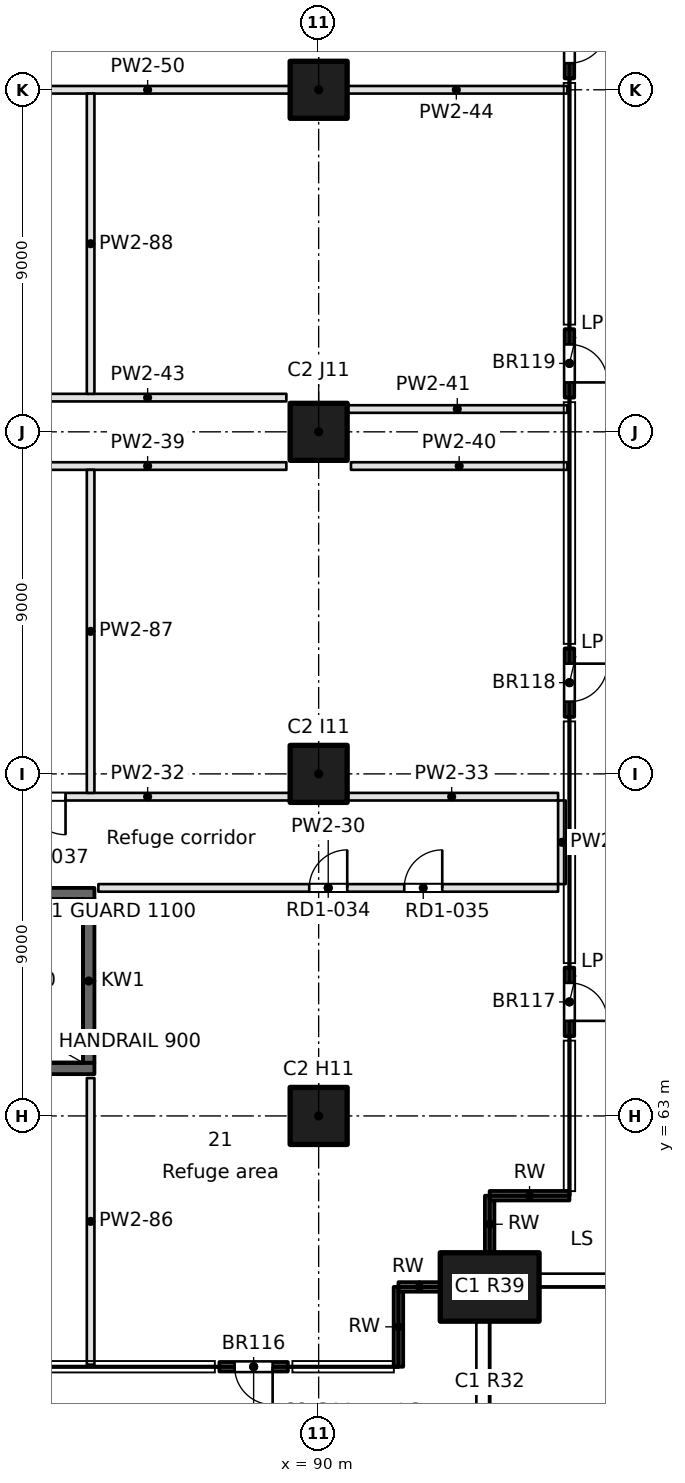
"""IFC4 building model, lengths in metres.
Left out: names, types, materials, properties, quantities, classifications, styles, units other than length and angle.
Written with IfcOpenShell. Run it as: python <this file> out.ifc"""

import sys

from ifc_helpers import new_model, si_unit, direction, frame, frame_2d, origin, origin_2d, place, context, subcontext, project, spatial, rectangle, extrude, element, fill, save


model = new_model("IFC4")
c1 = context("Model", 3, precision=1e-05, world=origin(), true_north=direction((0.0, 1.0)))
c2 = subcontext(c1, "Body", "Model", "MODEL_VIEW")
j1 = project(units=[si_unit("LENGTHUNIT", "METRE"), si_unit("PLANEANGLEUNIT", "RADIAN")], contexts=[c1])
p1 = place(None, origin())
s1 = spatial("IfcSite", under=j1, at=p1, CompositionType="ELEMENT")
p2 = place(p1, origin())
s2 = spatial("IfcBuilding", under=s1, at=p2, CompositionType="ELEMENT")
p3 = place(p2, frame((0.0, 0.0, 31.2)))
s3 = spatial("IfcBuildingStorey", under=s2, at=p3, CompositionType="ELEMENT", Elevation=31.2)
p4 = place(p3, frame((94.5, 58.5, 0.0), z_axis=(0.0, 0.0, 1.0), x_axis=(1.0, 0.0, 0.0)))
e1 = element("IfcColumn", 1, at=p4, inside=s3, PredefinedType="COLUMN", context=c2, shape_type="SweptSolid", body=[
    extrude(rectangle(XDim=2.6, YDim=1.8, at=origin_2d()), origin(), (0.0, 0.0, 1.0), 4.6),
])
for number, where, z_axis, x_axis in (
    (2, (90.0, 63.0, 0.0), (0.0, 0.0, 1.0), (1.0, 0.0, 0.0)),
    (3, (90.0, 72.0, 0.0), (0.0, 0.0, 1.0), (1.0, 0.0, 0.0)),
    (4, (90.0, 81.0, 0.0), (0.0, 0.0, 1.0), (1.0, 0.0, 0.0)),
    (5, (90.0, 90.0, 0.0), (0.0, 0.0, 1.0), (1.0, 0.0, 0.0)),
):
    element("IfcColumn", number, at=place(p3, frame(where, z_axis=z_axis, x_axis=x_axis)), inside=s3, PredefinedType="COLUMN", context=c2, shape_type="SweptSolid", body=[
        extrude(rectangle(XDim=1.5, YDim=1.5, at=origin_2d()), origin(), (0.0, 0.0, 1.0), 4.6),
    ])
p5 = place(p3, frame((87.389, 56.401, 0.0), z_axis=(0.0, 0.0, 1.0), x_axis=(1.0, 0.0, 0.0)))
e6 = element("IfcWall", 6, at=p5, inside=s3, PredefinedType="SOLIDWALL", context=c2, shape_type="SweptSolid", body=[
    extrude(rectangle(XDim=1.8, YDim=0.25, at=frame_2d((0.9, 0.0))), origin(), (0.0, 0.0, 1.0), 4.2),
])
p6 = place(p5, frame((0.4, 0.0, 0.0)))
e7 = element("IfcOpeningElement", 7, at=p6, cuts=e6, PredefinedType="OPENING", context=c2, shape_type="SweptSolid", body=[
    extrude(rectangle(XDim=1.0, YDim=2.1, at=frame_2d((0.5, 1.05))), frame((0.0, 0.125, 0.0), z_axis=(0.0, -1.0, 0.0), x_axis=(1.0, 0.0, 0.0)), (0.0, 0.0, 1.0), 0.25),
])
p7 = place(p3, frame((92.099, 56.401, 0.0), z_axis=(0.0, 0.0, 1.0), x_axis=(0.00011626555, 0.999999993241, 0.0)))
e8 = element("IfcWall", 8, at=p7, inside=s3, PredefinedType="SOLIDWALL", context=c2, shape_type="SweptSolid", body=[
    extrude(rectangle(XDim=2.1, YDim=0.25, at=frame_2d((1.05, 0.0))), origin(), (0.0, 0.0, 1.0), 4.2),
])
p8 = place(p3, frame((92.099, 58.501, 0.0), z_axis=(0.0, 0.0, 1.0), x_axis=(1.0, 0.0, 0.0)))
e9 = element("IfcWall", 9, at=p8, inside=s3, PredefinedType="SOLIDWALL", context=c2, shape_type="SweptSolid", body=[
    extrude(rectangle(XDim=1.101, YDim=0.25, at=frame_2d((0.55, 0.0))), origin(), (0.0, 0.0, 1.0), 4.2),
])
p9 = place(p3, frame((94.499, 59.4, 0.0), z_axis=(0.0, 0.0, 1.0), x_axis=(0.00016268098, 0.999999986767, 0.0)))
e10 = element("IfcWall", 10, at=p9, inside=s3, PredefinedType="SOLIDWALL", context=c2, shape_type="SweptSolid", body=[
    extrude(rectangle(XDim=1.501, YDim=0.25, at=frame_2d((0.75, 0.0))), origin(), (0.0, 0.0, 1.0), 4.2),
])
p10 = place(p3, frame((94.499, 60.901, 0.0), z_axis=(0.0, 0.0, 1.0), x_axis=(0.999999993241, 0.00011626555, 0.0)))
e11 = element("IfcWall", 11, at=p10, inside=s3, PredefinedType="SOLIDWALL", context=c2, shape_type="SweptSolid", body=[
    extrude(rectangle(XDim=2.1, YDim=0.25, at=frame_2d((1.05, 0.0))), origin(), (0.0, 0.0, 1.0), 4.2),
])
p11 = place(p3, frame((96.599, 65.101, 0.0), z_axis=(0.0, 0.0, 1.0), x_axis=(0.0, 1.0, 0.0)))
e12 = element("IfcWall", 12, at=p11, inside=s3, PredefinedType="SOLIDWALL", context=c2, shape_type="SweptSolid", body=[
    extrude(rectangle(XDim=1.8, YDim=0.25, at=frame_2d((0.9, 0.0))), origin(), (0.0, 0.0, 1.0), 4.2),
])
p12 = place(p11, frame((0.4, 0.0, 0.0)))
e13 = element("IfcOpeningElement", 13, at=p12, cuts=e12, PredefinedType="OPENING", context=c2, shape_type="SweptSolid", body=[
    extrude(rectangle(XDim=1.0, YDim=2.1, at=frame_2d((0.5, 1.05))), frame((0.0, 0.125, 0.0), z_axis=(0.0, -1.0, 0.0), x_axis=(1.0, 0.0, 0.0)), (0.0, 0.0, 1.0), 0.25),
])
p13 = place(p3, frame((96.599, 73.501, 0.0), z_axis=(0.0, 0.0, 1.0), x_axis=(0.0, 1.0, 0.0)))
e14 = element("IfcWall", 14, at=p13, inside=s3, PredefinedType="SOLIDWALL", context=c2, shape_type="SweptSolid", body=[
    extrude(rectangle(XDim=1.8, YDim=0.25, at=frame_2d((0.9, 0.0))), origin(), (0.0, 0.0, 1.0), 4.2),
])
p14 = place(p13, frame((0.4, 0.0, 0.0)))
e15 = element("IfcOpeningElement", 15, at=p14, cuts=e14, PredefinedType="OPENING", context=c2, shape_type="SweptSolid", body=[
    extrude(rectangle(XDim=1.0, YDim=2.1, at=frame_2d((0.5, 1.05))), frame((0.0, 0.125, 0.0), z_axis=(0.0, -1.0, 0.0), x_axis=(1.0, 0.0, 0.0)), (0.0, 0.0, 1.0), 0.25),
])
p15 = place(p3, frame((96.599, 81.9, 0.0), z_axis=(0.0, 0.0, 1.0), x_axis=(0.0, 1.0, 0.0)))
e16 = element("IfcWall", 16, at=p15, inside=s3, PredefinedType="SOLIDWALL", context=c2, shape_type="SweptSolid", body=[
    extrude(rectangle(XDim=1.8, YDim=0.25, at=frame_2d((0.9, 0.0))), origin(), (0.0, 0.0, 1.0), 4.2),
])
p16 = place(p15, frame((0.4, 0.0, 0.0)))
e17 = element("IfcOpeningElement", 17, at=p16, cuts=e16, PredefinedType="OPENING", context=c2, shape_type="SweptSolid", body=[
    extrude(rectangle(XDim=1.0, YDim=2.1, at=frame_2d((0.5, 1.05))), frame((0.0, 0.125, 0.0), z_axis=(0.0, -1.0, 0.0), x_axis=(1.0, 0.0, 0.0)), (0.0, 0.0, 1.0), 0.25),
])
p17 = place(p3, frame((96.599, 90.3, 0.0), z_axis=(0.0, 0.0, 1.0), x_axis=(0.0, 1.0, 0.0)))
e18 = element("IfcWall", 18, at=p17, inside=s3, PredefinedType="SOLIDWALL", context=c2, shape_type="SweptSolid", body=[
    extrude(rectangle(XDim=1.8, YDim=0.25, at=frame_2d((0.9, 0.0))), origin(), (0.0, 0.0, 1.0), 4.2),
])
p18 = place(p17, frame((0.4, 0.0, 0.0)))
e19 = element("IfcOpeningElement", 19, at=p18, cuts=e18, PredefinedType="OPENING", context=c2, shape_type="SweptSolid", body=[
    extrude(rectangle(XDim=1.0, YDim=2.1, at=frame_2d((0.5, 1.05))), frame((0.0, 0.125, 0.0), z_axis=(0.0, -1.0, 0.0), x_axis=(1.0, 0.0, 0.0)), (0.0, 0.0, 1.0), 0.25),
])
for number, where, z_axis, x_axis in (
    (20, (75.9, 64.25, -0.45), (0.0, 0.0, 1.0), (1.0, 0.0, 0.0)),
    (21, (75.9, 68.85, -0.45), (0.0, 0.0, 1.0), (1.0, 0.0, 0.0)),
):
    element("IfcWall", number, at=place(p3, frame(where, z_axis=z_axis, x_axis=x_axis)), inside=s3, PredefinedType="SOLIDWALL", context=c2, shape_type="SweptSolid", body=[
        extrude(rectangle(XDim=8.2, YDim=0.3, at=frame_2d((4.1, 0.0))), origin(), (0.0, 0.0, 1.0), 4.65),
    ])
p19 = place(p3, frame((83.95, 64.4, -0.45), z_axis=(0.0, 0.0, 1.0), x_axis=(0.0, 1.0, 0.0)))
e22 = element("IfcWall", 22, at=p19, inside=s3, PredefinedType="SOLIDWALL", context=c2, shape_type="SweptSolid", body=[
    extrude(rectangle(XDim=4.3, YDim=0.3, at=frame_2d((2.15, 0.0))), origin(), (0.0, 0.0, 1.0), 4.65),
])
p20 = place(p3, frame((96.3, 69.0, 0.0), z_axis=(0.0, 0.0, 1.0), x_axis=(-1.0, 0.0, 0.0)))
e23 = element("IfcWall", 23, at=p20, inside=s3, PredefinedType="PARTITIONING", context=c2, shape_type="SweptSolid", body=[
    extrude(rectangle(XDim=12.096, YDim=0.2, at=frame_2d((6.048, 0.0))), origin(), (0.0, 0.0, 1.0), 4.2),
])
p21 = place(p20, frame((5.548, 0.0, 0.0)))
e24 = element("IfcOpeningElement", 24, at=p21, cuts=e23, PredefinedType="OPENING", context=c2, shape_type="SweptSolid", body=[
    extrude(rectangle(XDim=1.0, YDim=2.1, at=frame_2d((0.5, 1.05))), frame((0.0, 0.1, 0.0), z_axis=(0.0, -1.0, 0.0), x_axis=(1.0, 0.0, 0.0)), (0.0, 0.0, 1.0), 0.2),
])
p22 = place(p20, frame((3.048, 0.0, 0.0)))
e25 = element("IfcOpeningElement", 25, at=p22, cuts=e23, PredefinedType="OPENING", context=c2, shape_type="SweptSolid", body=[
    extrude(rectangle(XDim=1.0, YDim=2.1, at=frame_2d((0.5, 1.05))), frame((0.0, 0.1, 0.0), z_axis=(0.0, -1.0, 0.0), x_axis=(1.0, 0.0, 0.0)), (0.0, 0.0, 1.0), 0.2),
])
p23 = place(p3, frame((81.7, 71.4, 0.0), z_axis=(0.0, 0.0, 1.0), x_axis=(1.0, 0.0, 0.0)))
e26 = element("IfcWall", 26, at=p23, inside=s3, PredefinedType="PARTITIONING", context=c2, shape_type="SweptSolid", body=[
    extrude(rectangle(XDim=7.6, YDim=0.2, at=frame_2d((3.8, 0.0))), origin(), (0.0, 0.0, 1.0), 4.2),
])
p24 = place(p23, frame((0.64, 0.0, 0.0)))
e27 = element("IfcOpeningElement", 27, at=p24, cuts=e26, PredefinedType="OPENING", context=c2, shape_type="SweptSolid", body=[
    extrude(rectangle(XDim=1.0, YDim=2.1, at=frame_2d((0.5, 1.05))), frame((0.0, 0.1, 0.0), z_axis=(0.0, -1.0, 0.0), x_axis=(1.0, 0.0, 0.0)), (0.0, 0.0, 1.0), 0.2),
])
p25 = place(p3, frame((90.7, 71.4, 0.0), z_axis=(0.0, 0.0, 1.0), x_axis=(1.0, 0.0, 0.0)))
e28 = element("IfcWall", 28, at=p25, inside=s3, PredefinedType="PARTITIONING", context=c2, shape_type="SweptSolid", body=[
    extrude(rectangle(XDim=5.6, YDim=0.2, at=frame_2d((2.8, 0.0))), origin(), (0.0, 0.0, 1.0), 4.2),
])
p26 = place(p3, frame((81.85, 80.1, 0.0), z_axis=(0.0, 0.0, 1.0), x_axis=(1.0, 0.0, 0.0)))
e29 = element("IfcWall", 29, at=p26, inside=s3, PredefinedType="PARTITIONING", context=c2, shape_type="SweptSolid", body=[
    extrude(rectangle(XDim=7.3, YDim=0.2, at=frame_2d((3.65, 0.0))), origin(), (0.0, 0.0, 1.0), 4.2),
])
p27 = place(p3, frame((90.85, 80.1, 0.0), z_axis=(0.0, 0.0, 1.0), x_axis=(1.0, 0.0, 0.0)))
e30 = element("IfcWall", 30, at=p27, inside=s3, PredefinedType="PARTITIONING", context=c2, shape_type="SweptSolid", body=[
    extrude(rectangle(XDim=5.695, YDim=0.2, at=frame_2d((2.847, 0.0))), origin(), (0.0, 0.0, 1.0), 4.2),
])
p28 = place(p3, frame((90.75, 81.6, 0.0), z_axis=(0.0, 0.0, 1.0), x_axis=(1.0, 0.0, 0.0)))
e31 = element("IfcWall", 31, at=p28, inside=s3, PredefinedType="PARTITIONING", context=c2, shape_type="SweptSolid", body=[
    extrude(rectangle(XDim=5.795, YDim=0.2, at=frame_2d((2.897, 0.0))), origin(), (0.0, 0.0, 1.0), 4.2),
])
p29 = place(p3, frame((81.85, 81.9, 0.0), z_axis=(0.0, 0.0, 1.0), x_axis=(1.0, 0.0, 0.0)))
e32 = element("IfcWall", 32, at=p29, inside=s3, PredefinedType="PARTITIONING", context=c2, shape_type="SweptSolid", body=[
    extrude(rectangle(XDim=7.3, YDim=0.2, at=frame_2d((3.65, 0.0))), origin(), (0.0, 0.0, 1.0), 4.2),
])
p30 = place(p3, frame((96.545, 90.0, 0.0), z_axis=(0.0, 0.0, 1.0), x_axis=(-1.0, 0.0, 0.0)))
e33 = element("IfcWall", 33, at=p30, inside=s3, PredefinedType="PARTITIONING", context=c2, shape_type="SweptSolid", body=[
    extrude(rectangle(XDim=5.845, YDim=0.2, at=frame_2d((2.922, 0.0))), origin(), (0.0, 0.0, 1.0), 4.2),
])
p31 = place(p3, frame((89.3, 90.0, 0.0), z_axis=(0.0, 0.0, 1.0), x_axis=(-1.0, 0.0, 0.0)))
e34 = element("IfcWall", 34, at=p31, inside=s3, PredefinedType="PARTITIONING", context=c2, shape_type="SweptSolid", body=[
    extrude(rectangle(XDim=7.6, YDim=0.2, at=frame_2d((3.8, 0.0))), origin(), (0.0, 0.0, 1.0), 4.2),
])
p32 = place(p3, frame((84.0, 63.996, 0.0), z_axis=(0.0, 0.0, 1.0), x_axis=(0.0, -1.0, 0.0)))
e35 = element("IfcWall", 35, at=p32, inside=s3, PredefinedType="PARTITIONING", context=c2, shape_type="SweptSolid", body=[
    extrude(rectangle(XDim=7.541, YDim=0.2, at=frame_2d((3.771, 0.0))), origin(), (0.0, 0.0, 1.0), 4.2),
])
p33 = place(p3, frame((84.0, 80.0, 0.0), z_axis=(0.0, 0.0, 1.0), x_axis=(0.0, -1.0, 0.0)))
e36 = element("IfcWall", 36, at=p33, inside=s3, PredefinedType="PARTITIONING", context=c2, shape_type="SweptSolid", body=[
    extrude(rectangle(XDim=8.5, YDim=0.2, at=frame_2d((4.25, 0.0))), origin(), (0.0, 0.0, 1.0), 4.2),
])
p34 = place(p3, frame((84.0, 89.9, 0.0), z_axis=(0.0, 0.0, 1.0), x_axis=(0.0, -1.0, 0.0)))
e37 = element("IfcWall", 37, at=p34, inside=s3, PredefinedType="PARTITIONING", context=c2, shape_type="SweptSolid", body=[
    extrude(rectangle(XDim=7.9, YDim=0.2, at=frame_2d((3.95, 0.0))), origin(), (0.0, 0.0, 1.0), 4.2),
])
p35 = place(p3, frame((96.4, 71.3, 0.0), z_axis=(0.0, 0.0, 1.0), x_axis=(0.0, -1.0, 0.0)))
e38 = element("IfcWall", 38, at=p35, inside=s3, PredefinedType="PARTITIONING", context=c2, shape_type="SweptSolid", body=[
    extrude(rectangle(XDim=2.2, YDim=0.2, at=frame_2d((1.1, 0.0))), origin(), (0.0, 0.0, 1.0), 4.2),
])
p36 = place(p6, frame((1.0, 0.0, 0.0), z_axis=(0.0, 0.0, 1.0), x_axis=(-1.0, 0.0, 0.0)))
e39 = element("IfcDoor", 39, at=p36, inside=s3, OperationType="SINGLE_SWING_LEFT", PredefinedType="DOOR", context=c2, shape_type="SweptSolid", body=[
    extrude(rectangle(XDim=1.0, YDim=2.1, at=frame_2d((0.5, 1.05))), frame((0.0, 0.025, 0.0), z_axis=(0.0, -1.0, 0.0), x_axis=(1.0, 0.0, 0.0)), (0.0, 0.0, 1.0), 0.05),
])
fill(e7, e39)
p37 = place(p12, frame((1.0, 0.0, 0.0), z_axis=(0.0, 0.0, 1.0), x_axis=(-1.0, 0.0, 0.0)))
e40 = element("IfcDoor", 40, at=p37, inside=s3, OperationType="SINGLE_SWING_RIGHT", PredefinedType="DOOR", context=c2, shape_type="SweptSolid", body=[
    extrude(rectangle(XDim=1.0, YDim=2.1, at=frame_2d((0.5, 1.05))), frame((0.0, 0.025, 0.0), z_axis=(0.0, -1.0, 0.0), x_axis=(1.0, 0.0, 0.0)), (0.0, 0.0, 1.0), 0.05),
])
fill(e13, e40)
p38 = place(p14, frame((1.0, 0.0, 0.0), z_axis=(0.0, 0.0, 1.0), x_axis=(-1.0, 0.0, 0.0)))
e41 = element("IfcDoor", 41, at=p38, inside=s3, OperationType="SINGLE_SWING_LEFT", PredefinedType="DOOR", context=c2, shape_type="SweptSolid", body=[
    extrude(rectangle(XDim=1.0, YDim=2.1, at=frame_2d((0.5, 1.05))), frame((0.0, 0.025, 0.0), z_axis=(0.0, -1.0, 0.0), x_axis=(1.0, 0.0, 0.0)), (0.0, 0.0, 1.0), 0.05),
])
fill(e15, e41)
p39 = place(p16, frame((1.0, 0.0, 0.0), z_axis=(0.0, 0.0, 1.0), x_axis=(-1.0, 0.0, 0.0)))
e42 = element("IfcDoor", 42, at=p39, inside=s3, OperationType="SINGLE_SWING_RIGHT", PredefinedType="DOOR", context=c2, shape_type="SweptSolid", body=[
    extrude(rectangle(XDim=1.0, YDim=2.1, at=frame_2d((0.5, 1.05))), frame((0.0, 0.025, 0.0), z_axis=(0.0, -1.0, 0.0), x_axis=(1.0, 0.0, 0.0)), (0.0, 0.0, 1.0), 0.05),
])
fill(e17, e42)
p40 = place(p18, frame((1.0, 0.0, 0.0), z_axis=(0.0, 0.0, 1.0), x_axis=(-1.0, 0.0, 0.0)))
e43 = element("IfcDoor", 43, at=p40, inside=s3, OperationType="SINGLE_SWING_LEFT", PredefinedType="DOOR", context=c2, shape_type="SweptSolid", body=[
    extrude(rectangle(XDim=1.0, YDim=2.1, at=frame_2d((0.5, 1.05))), frame((0.0, 0.025, 0.0), z_axis=(0.0, -1.0, 0.0), x_axis=(1.0, 0.0, 0.0)), (0.0, 0.0, 1.0), 0.05),
])
fill(e19, e43)
p41 = place(p21, frame((1.0, 0.0, 0.0), z_axis=(0.0, 0.0, 1.0), x_axis=(-1.0, 0.0, 0.0)))
e44 = element("IfcDoor", 44, at=p41, inside=s3, OperationType="SINGLE_SWING_RIGHT", PredefinedType="DOOR", context=c2, shape_type="SweptSolid", body=[
    extrude(rectangle(XDim=1.0, YDim=2.1, at=frame_2d((0.5, 1.05))), frame((0.0, 0.025, 0.0), z_axis=(0.0, -1.0, 0.0), x_axis=(1.0, 0.0, 0.0)), (0.0, 0.0, 1.0), 0.05),
])
fill(e24, e44)
p42 = place(p22, frame((1.0, 0.0, 0.0), z_axis=(0.0, 0.0, 1.0), x_axis=(-1.0, 0.0, 0.0)))
e45 = element("IfcDoor", 45, at=p42, inside=s3, OperationType="SINGLE_SWING_RIGHT", PredefinedType="DOOR", context=c2, shape_type="SweptSolid", body=[
    extrude(rectangle(XDim=1.0, YDim=2.1, at=frame_2d((0.5, 1.05))), frame((0.0, 0.025, 0.0), z_axis=(0.0, -1.0, 0.0), x_axis=(1.0, 0.0, 0.0)), (0.0, 0.0, 1.0), 0.05),
])
fill(e25, e45)
p43 = place(p24, frame((1.0, 0.0, 0.0), z_axis=(0.0, 0.0, 1.0), x_axis=(-1.0, 0.0, 0.0)))
e46 = element("IfcDoor", 46, at=p43, inside=s3, OperationType="SINGLE_SWING_LEFT", PredefinedType="DOOR", context=c2, shape_type="SweptSolid", body=[
    extrude(rectangle(XDim=1.0, YDim=2.1, at=frame_2d((0.5, 1.05))), frame((0.0, 0.025, 0.0), z_axis=(0.0, -1.0, 0.0), x_axis=(1.0, 0.0, 0.0)), (0.0, 0.0, 1.0), 0.05),
])
fill(e27, e46)
save(model, sys.argv[1])
